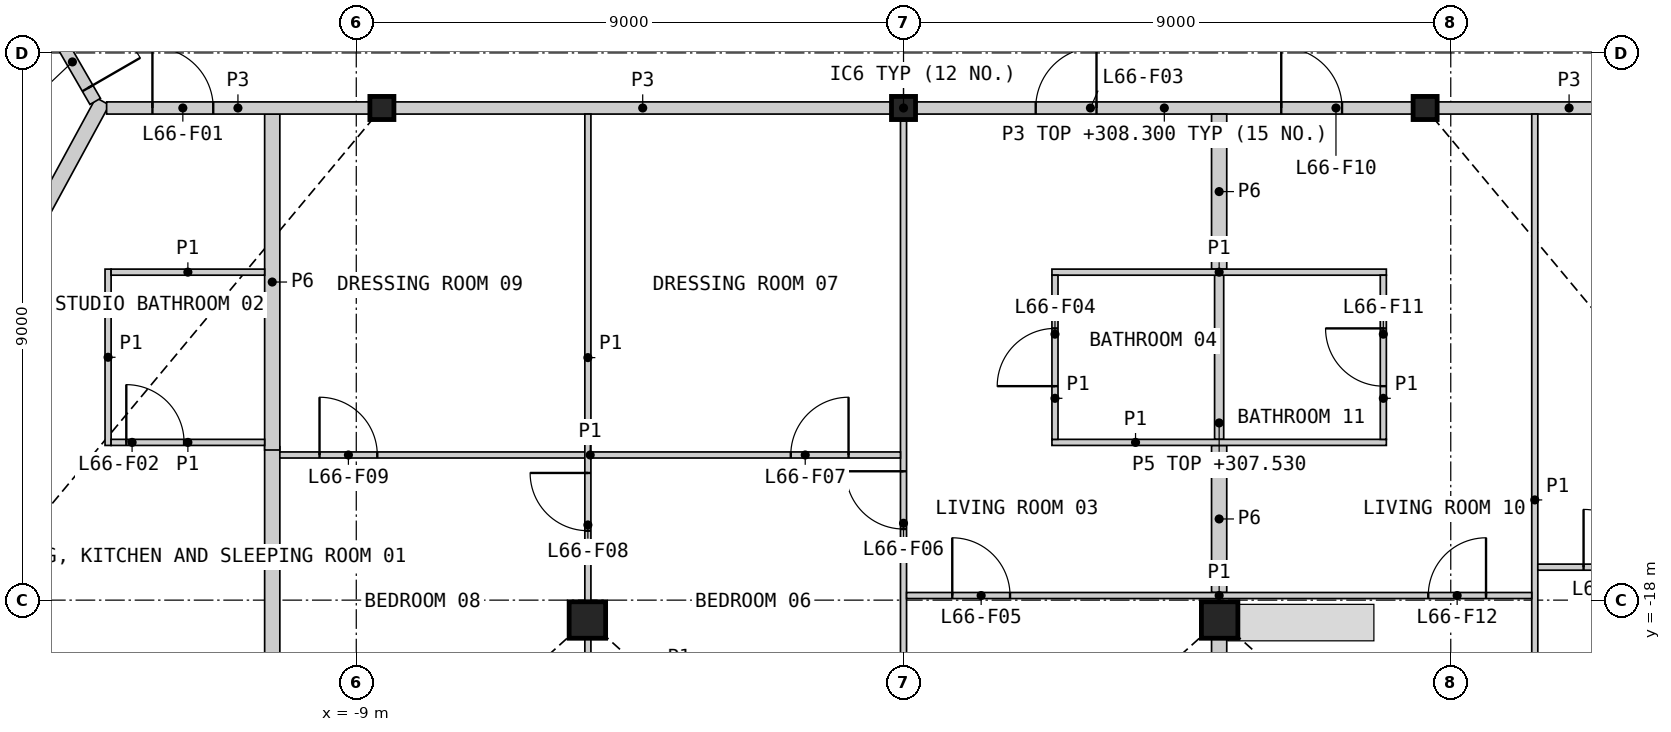
"""IFC4 building model, lengths in metres.
Left out: names, types, materials, properties, quantities, classifications, styles, units other than length and angle.
Written with IfcOpenShell. Run it as: python <this file> out.ifc"""

import sys

from ifc_helpers import new_model, si_unit, direction, frame, frame_2d, origin, origin_2d, place, context, subcontext, project, spatial, rectangle, hollow_rectangle, i_section, extrude, element, fill, save


model = new_model("IFC4")
c1 = context("Model", 3, precision=1e-05, world=origin(), true_north=direction((0.0, 1.0)))
c2 = subcontext(c1, "Body", "Model", "MODEL_VIEW")
j1 = project(units=[si_unit("LENGTHUNIT", "METRE"), si_unit("PLANEANGLEUNIT", "RADIAN")], contexts=[c1])
p1 = place(None, origin())
s1 = spatial("IfcSite", under=j1, at=p1, CompositionType="ELEMENT")
p2 = place(p1, origin())
s2 = spatial("IfcBuilding", under=s1, at=p2, CompositionType="ELEMENT")
p3 = place(p2, frame((0.0, 0.0, 305.2)))
s3 = spatial("IfcBuildingStorey", under=s2, at=p3, CompositionType="ELEMENT", Elevation=305.2)
for number, where, z_axis, x_axis in (
    (1, (-5.199, -18.327, 0.0), (0.0, 0.0, 1.0), (1.0, 0.0, 0.0)),
    (2, (5.199, -18.327, 0.0), (0.0, 0.0, 1.0), (1.0, 0.0, 0.0)),
):
    element("IfcColumn", number, at=place(p3, frame(where, z_axis=z_axis, x_axis=x_axis)), inside=s3, PredefinedType="COLUMN", context=c2, shape_type="SweptSolid", body=[
        extrude(hollow_rectangle(XDim=0.6, YDim=0.6, WallThickness=0.04, at=origin_2d()), origin(), (0.0, 0.0, 1.0), 3.4),
    ])
for number, where, z_axis, x_axis in (
    (3, (-8.578, -9.906, 0.0), (0.0, 0.0, 1.0), (1.0, 0.0, 0.0)),
    (4, (0.0, -9.906, 0.0), (0.0, 0.0, 1.0), (1.0, 0.0, 0.0)),
    (5, (8.578, -9.906, 0.0), (0.0, 0.0, 1.0), (1.0, 0.0, 0.0)),
):
    element("IfcColumn", number, at=place(p3, frame(where, z_axis=z_axis, x_axis=x_axis)), inside=s3, PredefinedType="COLUMN", context=c2, shape_type="SweptSolid", body=[
        extrude(i_section(OverallWidth=0.396, OverallDepth=0.381, WebThickness=0.019, FlangeThickness=0.03, at=origin_2d()), origin(), (0.0, 0.0, 1.0), 3.4),
    ])
p4 = place(p3, frame((-20.383, -23.078, 0.0), z_axis=(0.0, 0.0, 1.0), x_axis=(0.477177412766, 0.878806984921, 0.0)))
e6 = element("IfcWall", 6, at=p4, inside=s3, PredefinedType="PARTITIONING", context=c2, shape_type="SweptSolid", body=[
    extrude(rectangle(XDim=15.114, YDim=0.25, at=frame_2d((7.557, 0.0))), origin(), (0.0, 0.0, 1.0), 2.33),
])
p5 = place(p3, frame((0.208, -9.906, 0.0), z_axis=(0.0, 0.0, 1.0), x_axis=(1.0, 0.0, 0.0)))
e7 = element("IfcWall", 7, at=p5, inside=s3, PredefinedType="PARTITIONING", context=c2, shape_type="SweptSolid", body=[
    extrude(rectangle(XDim=8.163, YDim=0.2, at=frame_2d((4.082, 0.0))), origin(), (0.0, 0.0, 1.0), 3.1),
])
p6 = place(p5, frame((1.966, 0.0, 0.0)))
e8 = element("IfcOpeningElement", 8, at=p6, cuts=e7, PredefinedType="OPENING", context=c2, shape_type="SweptSolid", body=[
    extrude(rectangle(XDim=1.0, YDim=2.1, at=frame_2d((0.5, 1.05))), frame((0.0, 0.11, 0.0), z_axis=(0.0, -1.0, 0.0), x_axis=(1.0, 0.0, 0.0)), (0.0, 0.0, 1.0), 0.22),
])
p7 = place(p5, frame((6.004, 0.0, 0.0)))
e9 = element("IfcOpeningElement", 9, at=p7, cuts=e7, PredefinedType="OPENING", context=c2, shape_type="SweptSolid", body=[
    extrude(rectangle(XDim=1.0, YDim=2.1, at=frame_2d((0.5, 1.05))), frame((0.0, 0.11, 0.0), z_axis=(0.0, -1.0, 0.0), x_axis=(1.0, 0.0, 0.0)), (0.0, 0.0, 1.0), 0.22),
])
p8 = place(p3, frame((-8.371, -9.906, 0.0), z_axis=(0.0, 0.0, 1.0), x_axis=(1.0, 0.0, 0.0)))
e10 = element("IfcWall", 10, at=p8, inside=s3, PredefinedType="PARTITIONING", context=c2, shape_type="SweptSolid", body=[
    extrude(rectangle(XDim=8.163, YDim=0.2, at=frame_2d((4.082, 0.0))), origin(), (0.0, 0.0, 1.0), 3.1),
])
p9 = place(p3, frame((-10.382, -22.698, 0.0), z_axis=(0.0, 0.0, 1.0), x_axis=(0.0, 1.0, 0.0)))
e11 = element("IfcWall", 11, at=p9, inside=s3, PredefinedType="PARTITIONING", context=c2, shape_type="SweptSolid", body=[
    extrude(rectangle(XDim=7.22, YDim=0.25, at=frame_2d((3.61, 0.0))), origin(), (0.0, 0.0, 1.0), 2.33),
])
p10 = place(p3, frame((-10.382, -15.531, 0.0), z_axis=(0.0, 0.0, 1.0), x_axis=(0.0, 1.0, 0.0)))
e12 = element("IfcWall", 12, at=p10, inside=s3, PredefinedType="PARTITIONING", context=c2, shape_type="SweptSolid", body=[
    extrude(rectangle(XDim=5.525, YDim=0.25, at=frame_2d((2.762, 0.0))), origin(), (0.0, 0.0, 1.0), 2.33),
])
p11 = place(p3, frame((-13.106, -9.906, 0.0), z_axis=(0.0, 0.0, 1.0), x_axis=(1.0, 0.0, 0.0)))
e13 = element("IfcWall", 13, at=p11, inside=s3, PredefinedType="PARTITIONING", context=c2, shape_type="SweptSolid", body=[
    extrude(rectangle(XDim=4.32, YDim=0.2, at=frame_2d((2.16, 0.0))), origin(), (0.0, 0.0, 1.0), 3.1),
])
p12 = place(p11, frame((0.753, 0.0, 0.0)))
e14 = element("IfcOpeningElement", 14, at=p12, cuts=e13, PredefinedType="OPENING", context=c2, shape_type="SweptSolid", body=[
    extrude(rectangle(XDim=1.0, YDim=2.1, at=frame_2d((0.5, 1.05))), frame((0.0, 0.11, 0.0), z_axis=(0.0, -1.0, 0.0), x_axis=(1.0, 0.0, 0.0)), (0.0, 0.0, 1.0), 0.22),
])
p13 = place(p3, frame((8.786, -9.906, 0.0), z_axis=(0.0, 0.0, 1.0), x_axis=(1.0, 0.0, 0.0)))
e15 = element("IfcWall", 15, at=p13, inside=s3, PredefinedType="PARTITIONING", context=c2, shape_type="SweptSolid", body=[
    extrude(rectangle(XDim=4.32, YDim=0.2, at=frame_2d((2.16, 0.0))), origin(), (0.0, 0.0, 1.0), 3.1),
])
p14 = place(p3, frame((-15.131, -6.614, 0.0), z_axis=(0.0, 0.0, 1.0), x_axis=(0.499967746641, -0.866044024469, 0.0)))
e16 = element("IfcWall", 16, at=p14, inside=s3, PredefinedType="PARTITIONING", context=c2, shape_type="SweptSolid", body=[
    extrude(rectangle(XDim=3.676, YDim=0.2, at=frame_2d((1.838, 0.0))), origin(), (0.0, 0.0, 1.0), 3.1),
])
p15 = place(p14, frame((2.426, 0.0, 0.0)))
e17 = element("IfcOpeningElement", 17, at=p15, cuts=e16, PredefinedType="OPENING", context=c2, shape_type="SweptSolid", body=[
    extrude(rectangle(XDim=1.0, YDim=2.1, at=frame_2d((0.5, 1.05))), frame((0.0, 0.11, 0.0), z_axis=(0.0, -1.0, 0.0), x_axis=(1.0, 0.0, 0.0)), (0.0, 0.0, 1.0), 0.22),
])
p16 = place(p3, frame((5.191, -12.556, 0.0), z_axis=(0.0, 0.0, 1.0), x_axis=(0.0, 1.0, 0.0)))
e18 = element("IfcWall", 18, at=p16, inside=s3, PredefinedType="PARTITIONING", context=c2, shape_type="SweptSolid", body=[
    extrude(rectangle(XDim=2.55, YDim=0.25, at=frame_2d((1.275, 0.0))), origin(), (0.0, 0.0, 1.0), 2.33),
])
p17 = place(p3, frame((5.191, -17.875, 0.0), z_axis=(0.0, 0.0, 1.0), x_axis=(0.0, 1.0, 0.0)))
e19 = element("IfcWall", 19, at=p17, inside=s3, PredefinedType="PARTITIONING", context=c2, shape_type="SweptSolid", body=[
    extrude(rectangle(XDim=2.419, YDim=0.25, at=frame_2d((1.209, 0.0))), origin(), (0.0, 0.0, 1.0), 2.33),
])
p18 = place(p3, frame((5.191, -19.055, 0.0), z_axis=(0.0, 0.0, 1.0), x_axis=(0.0, 1.0, 0.0)))
e20 = element("IfcWall", 20, at=p18, inside=s3, PredefinedType="PARTITIONING", context=c2, shape_type="SweptSolid", body=[
    extrude(rectangle(XDim=0.418, YDim=0.25, at=frame_2d((0.209, 0.0))), origin(), (0.0, 0.0, 1.0), 2.33),
])
p19 = place(p3, frame((5.191, -15.356, 0.0), z_axis=(0.0, 0.0, 1.0), x_axis=(0.0, 1.0, 0.0)))
e21 = element("IfcWall", 21, at=p19, inside=s3, PredefinedType="PLUMBINGWALL", context=c2, shape_type="SweptSolid", body=[
    extrude(rectangle(XDim=2.7, YDim=0.15, at=frame_2d((1.35, 0.0))), origin(), (0.0, 0.0, 1.0), 2.33),
])
p20 = place(p3, frame((10.382, -22.698, 0.0), z_axis=(0.0, 0.0, 1.0), x_axis=(0.0, 1.0, 0.0)))
e22 = element("IfcWall", 22, at=p20, inside=s3, PredefinedType="PARTITIONING", context=c2, shape_type="SweptSolid", body=[
    extrude(rectangle(XDim=12.692, YDim=0.1, at=frame_2d((6.346, 0.0))), origin(), (0.0, 0.0, 1.0), 2.33),
])
p21 = place(p20, frame((1.153, 0.0, 0.0)))
e23 = element("IfcOpeningElement", 23, at=p21, cuts=e22, PredefinedType="OPENING", context=c2, shape_type="SweptSolid", body=[
    extrude(rectangle(XDim=0.95, YDim=2.1, at=frame_2d((0.475, 1.05))), frame((0.0, 0.06, 0.0), z_axis=(0.0, -1.0, 0.0), x_axis=(1.0, 0.0, 0.0)), (0.0, 0.0, 1.0), 0.12),
])
p22 = place(p3, frame((0.0, -22.698, 0.0), z_axis=(0.0, 0.0, 1.0), x_axis=(0.0, 1.0, 0.0)))
e24 = element("IfcWall", 24, at=p22, inside=s3, PredefinedType="PARTITIONING", context=c2, shape_type="SweptSolid", body=[
    extrude(rectangle(XDim=12.585, YDim=0.1, at=frame_2d((6.292, 0.0))), origin(), (0.0, 0.0, 1.0), 2.33),
])
p23 = place(p22, frame((5.868, 0.0, 0.0)))
e25 = element("IfcOpeningElement", 25, at=p23, cuts=e24, PredefinedType="OPENING", context=c2, shape_type="SweptSolid", body=[
    extrude(rectangle(XDim=0.95, YDim=2.1, at=frame_2d((0.475, 1.05))), frame((0.0, 0.06, 0.0), z_axis=(0.0, -1.0, 0.0), x_axis=(1.0, 0.0, 0.0)), (0.0, 0.0, 1.0), 0.12),
])
p24 = place(p3, frame((0.05, -17.924, 0.0), z_axis=(0.0, 0.0, 1.0), x_axis=(1.0, 0.0, 0.0)))
e26 = element("IfcWall", 26, at=p24, inside=s3, PredefinedType="PARTITIONING", context=c2, shape_type="SweptSolid", body=[
    extrude(rectangle(XDim=10.282, YDim=0.1, at=frame_2d((5.141, 0.0))), origin(), (0.0, 0.0, 1.0), 2.33),
])
p25 = place(p24, frame((0.752, 0.0, 0.0)))
e27 = element("IfcOpeningElement", 27, at=p25, cuts=e26, PredefinedType="OPENING", context=c2, shape_type="SweptSolid", body=[
    extrude(rectangle(XDim=0.95, YDim=2.1, at=frame_2d((0.475, 1.05))), frame((0.0, 0.06, 0.0), z_axis=(0.0, -1.0, 0.0), x_axis=(1.0, 0.0, 0.0)), (0.0, 0.0, 1.0), 0.12),
])
p26 = place(p24, frame((8.58, 0.0, 0.0)))
e28 = element("IfcOpeningElement", 28, at=p26, cuts=e26, PredefinedType="OPENING", context=c2, shape_type="SweptSolid", body=[
    extrude(rectangle(XDim=0.95, YDim=2.1, at=frame_2d((0.475, 1.05))), frame((0.0, 0.06, 0.0), z_axis=(0.0, -1.0, 0.0), x_axis=(1.0, 0.0, 0.0)), (0.0, 0.0, 1.0), 0.12),
])
p27 = place(p3, frame((-10.257, -15.613, 0.0), z_axis=(0.0, 0.0, 1.0), x_axis=(1.0, 0.0, 0.0)))
e29 = element("IfcWall", 29, at=p27, inside=s3, PredefinedType="PARTITIONING", context=c2, shape_type="SweptSolid", body=[
    extrude(rectangle(XDim=10.207, YDim=0.1, at=frame_2d((5.104, 0.0))), origin(), (0.0, 0.0, 1.0), 2.33),
])
p28 = place(p27, frame((8.403, 0.0, 0.0)))
e30 = element("IfcOpeningElement", 30, at=p28, cuts=e29, PredefinedType="OPENING", context=c2, shape_type="SweptSolid", body=[
    extrude(rectangle(XDim=0.95, YDim=2.1, at=frame_2d((0.475, 1.05))), frame((0.0, 0.06, 0.0), z_axis=(0.0, -1.0, 0.0), x_axis=(1.0, 0.0, 0.0)), (0.0, 0.0, 1.0), 0.12),
])
p29 = place(p27, frame((0.653, 0.0, 0.0)))
e31 = element("IfcOpeningElement", 31, at=p29, cuts=e29, PredefinedType="OPENING", context=c2, shape_type="SweptSolid", body=[
    extrude(rectangle(XDim=0.95, YDim=2.1, at=frame_2d((0.475, 1.05))), frame((0.0, 0.06, 0.0), z_axis=(0.0, -1.0, 0.0), x_axis=(1.0, 0.0, 0.0)), (0.0, 0.0, 1.0), 0.12),
])
p30 = place(p3, frame((-5.191, -18.017, 0.0), z_axis=(0.0, 0.0, 1.0), x_axis=(0.0, 1.0, 0.0)))
e32 = element("IfcWall", 32, at=p30, inside=s3, PredefinedType="PARTITIONING", context=c2, shape_type="SweptSolid", body=[
    extrude(rectangle(XDim=8.011, YDim=0.1, at=frame_2d((4.006, 0.0))), origin(), (0.0, 0.0, 1.0), 2.33),
])
p31 = place(p30, frame((1.158, 0.0, 0.0)))
e33 = element("IfcOpeningElement", 33, at=p31, cuts=e32, PredefinedType="OPENING", context=c2, shape_type="SweptSolid", body=[
    extrude(rectangle(XDim=0.95, YDim=2.1, at=frame_2d((0.475, 1.05))), frame((0.0, 0.06, 0.0), z_axis=(0.0, -1.0, 0.0), x_axis=(1.0, 0.0, 0.0)), (0.0, 0.0, 1.0), 0.12),
])
p32 = place(p3, frame((10.432, -17.458, 0.0), z_axis=(0.0, 0.0, 1.0), x_axis=(1.0, 0.0, 0.0)))
e34 = element("IfcWall", 34, at=p32, inside=s3, PredefinedType="PARTITIONING", context=c2, shape_type="SweptSolid", body=[
    extrude(rectangle(XDim=6.775, YDim=0.1, at=frame_2d((3.387, 0.0))), origin(), (0.0, 0.0, 1.0), 2.33),
])
p33 = place(p32, frame((0.752, 0.0, 0.0)))
e35 = element("IfcOpeningElement", 35, at=p33, cuts=e34, PredefinedType="OPENING", context=c2, shape_type="SweptSolid", body=[
    extrude(rectangle(XDim=0.95, YDim=2.1, at=frame_2d((0.475, 1.05))), frame((0.0, 0.06, 0.0), z_axis=(0.0, -1.0, 0.0), x_axis=(1.0, 0.0, 0.0)), (0.0, 0.0, 1.0), 0.12),
])
for number, where, z_axis, x_axis in (
    (36, (2.441, -12.606, 0.0), (0.0, 0.0, 1.0), (1.0, 0.0, 0.0)),
    (37, (2.441, -15.406, 0.0), (0.0, 0.0, 1.0), (1.0, 0.0, 0.0)),
):
    element("IfcWall", number, at=place(p3, frame(where, z_axis=z_axis, x_axis=x_axis)), inside=s3, PredefinedType="PARTITIONING", context=c2, shape_type="SweptSolid", body=[
        extrude(rectangle(XDim=5.5, YDim=0.1, at=frame_2d((2.75, 0.0))), origin(), (0.0, 0.0, 1.0), 2.33),
    ])
p34 = place(p3, frame((-13.082, -15.456, 0.0), z_axis=(0.0, 0.0, 1.0), x_axis=(0.0, 1.0, 0.0)))
e38 = element("IfcWall", 38, at=p34, inside=s3, PredefinedType="PARTITIONING", context=c2, shape_type="SweptSolid", body=[
    extrude(rectangle(XDim=2.9, YDim=0.1, at=frame_2d((1.45, 0.0))), origin(), (0.0, 0.0, 1.0), 2.33),
])
p35 = place(p3, frame((2.491, -15.356, 0.0), z_axis=(0.0, 0.0, 1.0), x_axis=(0.0, 1.0, 0.0)))
e39 = element("IfcWall", 39, at=p35, inside=s3, PredefinedType="PARTITIONING", context=c2, shape_type="SweptSolid", body=[
    extrude(rectangle(XDim=2.7, YDim=0.1, at=frame_2d((1.35, 0.0))), origin(), (0.0, 0.0, 1.0), 2.33),
])
p36 = place(p35, frame((0.875, 0.0, 0.0)))
e40 = element("IfcOpeningElement", 40, at=p36, cuts=e39, PredefinedType="OPENING", context=c2, shape_type="SweptSolid", body=[
    extrude(rectangle(XDim=0.95, YDim=2.1, at=frame_2d((0.475, 1.05))), frame((0.0, 0.06, 0.0), z_axis=(0.0, -1.0, 0.0), x_axis=(1.0, 0.0, 0.0)), (0.0, 0.0, 1.0), 0.12),
])
p37 = place(p3, frame((7.891, -15.356, 0.0), z_axis=(0.0, 0.0, 1.0), x_axis=(0.0, 1.0, 0.0)))
e41 = element("IfcWall", 41, at=p37, inside=s3, PredefinedType="PARTITIONING", context=c2, shape_type="SweptSolid", body=[
    extrude(rectangle(XDim=2.7, YDim=0.1, at=frame_2d((1.35, 0.0))), origin(), (0.0, 0.0, 1.0), 2.33),
])
p38 = place(p37, frame((0.875, 0.0, 0.0)))
e42 = element("IfcOpeningElement", 42, at=p38, cuts=e41, PredefinedType="OPENING", context=c2, shape_type="SweptSolid", body=[
    extrude(rectangle(XDim=0.95, YDim=2.1, at=frame_2d((0.475, 1.05))), frame((0.0, 0.06, 0.0), z_axis=(0.0, -1.0, 0.0), x_axis=(1.0, 0.0, 0.0)), (0.0, 0.0, 1.0), 0.12),
])
p39 = place(p3, frame((-13.032, -12.606, 0.0), z_axis=(0.0, 0.0, 1.0), x_axis=(1.0, 0.0, 0.0)))
e43 = element("IfcWall", 43, at=p39, inside=s3, PredefinedType="PARTITIONING", context=c2, shape_type="SweptSolid", body=[
    extrude(rectangle(XDim=2.525, YDim=0.1, at=frame_2d((1.263, 0.0))), origin(), (0.0, 0.0, 1.0), 2.33),
])
p40 = place(p3, frame((-13.032, -15.406, 0.0), z_axis=(0.0, 0.0, 1.0), x_axis=(1.0, 0.0, 0.0)))
e44 = element("IfcWall", 44, at=p40, inside=s3, PredefinedType="PARTITIONING", context=c2, shape_type="SweptSolid", body=[
    extrude(rectangle(XDim=2.525, YDim=0.1, at=frame_2d((1.263, 0.0))), origin(), (0.0, 0.0, 1.0), 2.33),
])
p41 = place(p40, frame((0.25, 0.0, 0.0)))
e45 = element("IfcOpeningElement", 45, at=p41, cuts=e44, PredefinedType="OPENING", context=c2, shape_type="SweptSolid", body=[
    extrude(rectangle(XDim=0.95, YDim=2.1, at=frame_2d((0.475, 1.05))), frame((0.0, 0.06, 0.0), z_axis=(0.0, -1.0, 0.0), x_axis=(1.0, 0.0, 0.0)), (0.0, 0.0, 1.0), 0.12),
])
p42 = place(p3, frame((-5.191, -19.055, 0.0), z_axis=(0.0, 0.0, 1.0), x_axis=(0.0, 1.0, 0.0)))
e46 = element("IfcWall", 46, at=p42, inside=s3, PredefinedType="PARTITIONING", context=c2, shape_type="SweptSolid", body=[
    extrude(rectangle(XDim=0.418, YDim=0.1, at=frame_2d((0.209, 0.0))), origin(), (0.0, 0.0, 1.0), 2.33),
])
p43 = place(p12, origin())
e47 = element("IfcDoor", 47, at=p43, inside=s3, OperationType="SINGLE_SWING_LEFT", PredefinedType="DOOR", context=c2, shape_type="SweptSolid", body=[
    extrude(rectangle(XDim=1.0, YDim=2.1, at=frame_2d((0.5, 1.05))), frame((0.0, 0.025, 0.0), z_axis=(0.0, -1.0, 0.0), x_axis=(1.0, 0.0, 0.0)), (0.0, 0.0, 1.0), 0.05),
])
fill(e14, e47)
p44 = place(p41, origin())
e48 = element("IfcDoor", 48, at=p44, inside=s3, OperationType="SINGLE_SWING_LEFT", PredefinedType="DOOR", context=c2, shape_type="SweptSolid", body=[
    extrude(rectangle(XDim=0.95, YDim=2.1, at=frame_2d((0.475, 1.05))), frame((0.0, 0.025, 0.0), z_axis=(0.0, -1.0, 0.0), x_axis=(1.0, 0.0, 0.0)), (0.0, 0.0, 1.0), 0.05),
])
fill(e45, e48)
p45 = place(p6, origin())
e49 = element("IfcDoor", 49, at=p45, inside=s3, OperationType="SINGLE_SWING_RIGHT", PredefinedType="DOOR", context=c2, shape_type="SweptSolid", body=[
    extrude(rectangle(XDim=1.0, YDim=2.1, at=frame_2d((0.5, 1.05))), frame((0.0, 0.025, 0.0), z_axis=(0.0, -1.0, 0.0), x_axis=(1.0, 0.0, 0.0)), (0.0, 0.0, 1.0), 0.05),
])
fill(e8, e49)
p46 = place(p36, origin())
e50 = element("IfcDoor", 50, at=p46, inside=s3, OperationType="SINGLE_SWING_LEFT", PredefinedType="DOOR", context=c2, shape_type="SweptSolid", body=[
    extrude(rectangle(XDim=0.95, YDim=2.1, at=frame_2d((0.475, 1.05))), frame((0.0, 0.025, 0.0), z_axis=(0.0, -1.0, 0.0), x_axis=(1.0, 0.0, 0.0)), (0.0, 0.0, 1.0), 0.05),
])
fill(e40, e50)
p47 = place(p25, origin())
e51 = element("IfcDoor", 51, at=p47, inside=s3, OperationType="SINGLE_SWING_LEFT", PredefinedType="DOOR", context=c2, shape_type="SweptSolid", body=[
    extrude(rectangle(XDim=0.95, YDim=2.1, at=frame_2d((0.475, 1.05))), frame((0.0, 0.025, 0.0), z_axis=(0.0, -1.0, 0.0), x_axis=(1.0, 0.0, 0.0)), (0.0, 0.0, 1.0), 0.05),
])
fill(e27, e51)
p48 = place(p23, origin())
e52 = element("IfcDoor", 52, at=p48, inside=s3, OperationType="SINGLE_SWING_RIGHT", PredefinedType="DOOR", context=c2, shape_type="SweptSolid", body=[
    extrude(rectangle(XDim=0.95, YDim=2.1, at=frame_2d((0.475, 1.05))), frame((0.0, 0.025, 0.0), z_axis=(0.0, -1.0, 0.0), x_axis=(1.0, 0.0, 0.0)), (0.0, 0.0, 1.0), 0.05),
])
fill(e25, e52)
p49 = place(p28, origin())
e53 = element("IfcDoor", 53, at=p49, inside=s3, OperationType="SINGLE_SWING_RIGHT", PredefinedType="DOOR", context=c2, shape_type="SweptSolid", body=[
    extrude(rectangle(XDim=0.95, YDim=2.1, at=frame_2d((0.475, 1.05))), frame((0.0, 0.025, 0.0), z_axis=(0.0, -1.0, 0.0), x_axis=(1.0, 0.0, 0.0)), (0.0, 0.0, 1.0), 0.05),
])
fill(e30, e53)
p50 = place(p31, origin())
e54 = element("IfcDoor", 54, at=p50, inside=s3, OperationType="SINGLE_SWING_RIGHT", PredefinedType="DOOR", context=c2, shape_type="SweptSolid", body=[
    extrude(rectangle(XDim=0.95, YDim=2.1, at=frame_2d((0.475, 1.05))), frame((0.0, 0.025, 0.0), z_axis=(0.0, -1.0, 0.0), x_axis=(1.0, 0.0, 0.0)), (0.0, 0.0, 1.0), 0.05),
])
fill(e33, e54)
p51 = place(p29, origin())
e55 = element("IfcDoor", 55, at=p51, inside=s3, OperationType="SINGLE_SWING_LEFT", PredefinedType="DOOR", context=c2, shape_type="SweptSolid", body=[
    extrude(rectangle(XDim=0.95, YDim=2.1, at=frame_2d((0.475, 1.05))), frame((0.0, 0.025, 0.0), z_axis=(0.0, -1.0, 0.0), x_axis=(1.0, 0.0, 0.0)), (0.0, 0.0, 1.0), 0.05),
])
fill(e31, e55)
p52 = place(p7, origin())
e56 = element("IfcDoor", 56, at=p52, inside=s3, OperationType="SINGLE_SWING_LEFT", PredefinedType="DOOR", context=c2, shape_type="SweptSolid", body=[
    extrude(rectangle(XDim=1.0, YDim=2.1, at=frame_2d((0.5, 1.05))), frame((0.0, 0.025, 0.0), z_axis=(0.0, -1.0, 0.0), x_axis=(1.0, 0.0, 0.0)), (0.0, 0.0, 1.0), 0.05),
])
fill(e9, e56)
p53 = place(p38, origin())
e57 = element("IfcDoor", 57, at=p53, inside=s3, OperationType="SINGLE_SWING_RIGHT", PredefinedType="DOOR", context=c2, shape_type="SweptSolid", body=[
    extrude(rectangle(XDim=0.95, YDim=2.1, at=frame_2d((0.475, 1.05))), frame((0.0, 0.025, 0.0), z_axis=(0.0, -1.0, 0.0), x_axis=(1.0, 0.0, 0.0)), (0.0, 0.0, 1.0), 0.05),
])
fill(e42, e57)
p54 = place(p26, origin())
e58 = element("IfcDoor", 58, at=p54, inside=s3, OperationType="SINGLE_SWING_RIGHT", PredefinedType="DOOR", context=c2, shape_type="SweptSolid", body=[
    extrude(rectangle(XDim=0.95, YDim=2.1, at=frame_2d((0.475, 1.05))), frame((0.0, 0.025, 0.0), z_axis=(0.0, -1.0, 0.0), x_axis=(1.0, 0.0, 0.0)), (0.0, 0.0, 1.0), 0.05),
])
fill(e28, e58)
p55 = place(p33, origin())
e59 = element("IfcDoor", 59, at=p55, inside=s3, OperationType="SINGLE_SWING_LEFT", PredefinedType="DOOR", context=c2, shape_type="SweptSolid", body=[
    extrude(rectangle(XDim=0.95, YDim=2.1, at=frame_2d((0.475, 1.05))), frame((0.0, 0.025, 0.0), z_axis=(0.0, -1.0, 0.0), x_axis=(1.0, 0.0, 0.0)), (0.0, 0.0, 1.0), 0.05),
])
fill(e35, e59)
p56 = place(p15, origin())
e60 = element("IfcDoor", 60, at=p56, inside=s3, OperationType="SINGLE_SWING_RIGHT", PredefinedType="DOOR", context=c2, shape_type="SweptSolid", body=[
    extrude(rectangle(XDim=1.0, YDim=2.1, at=frame_2d((0.5, 1.05))), frame((0.0, 0.025, 0.0), z_axis=(0.0, -1.0, 0.0), x_axis=(1.0, 0.0, 0.0)), (0.0, 0.0, 1.0), 0.05),
])
fill(e17, e60)
save(model, sys.argv[1])
